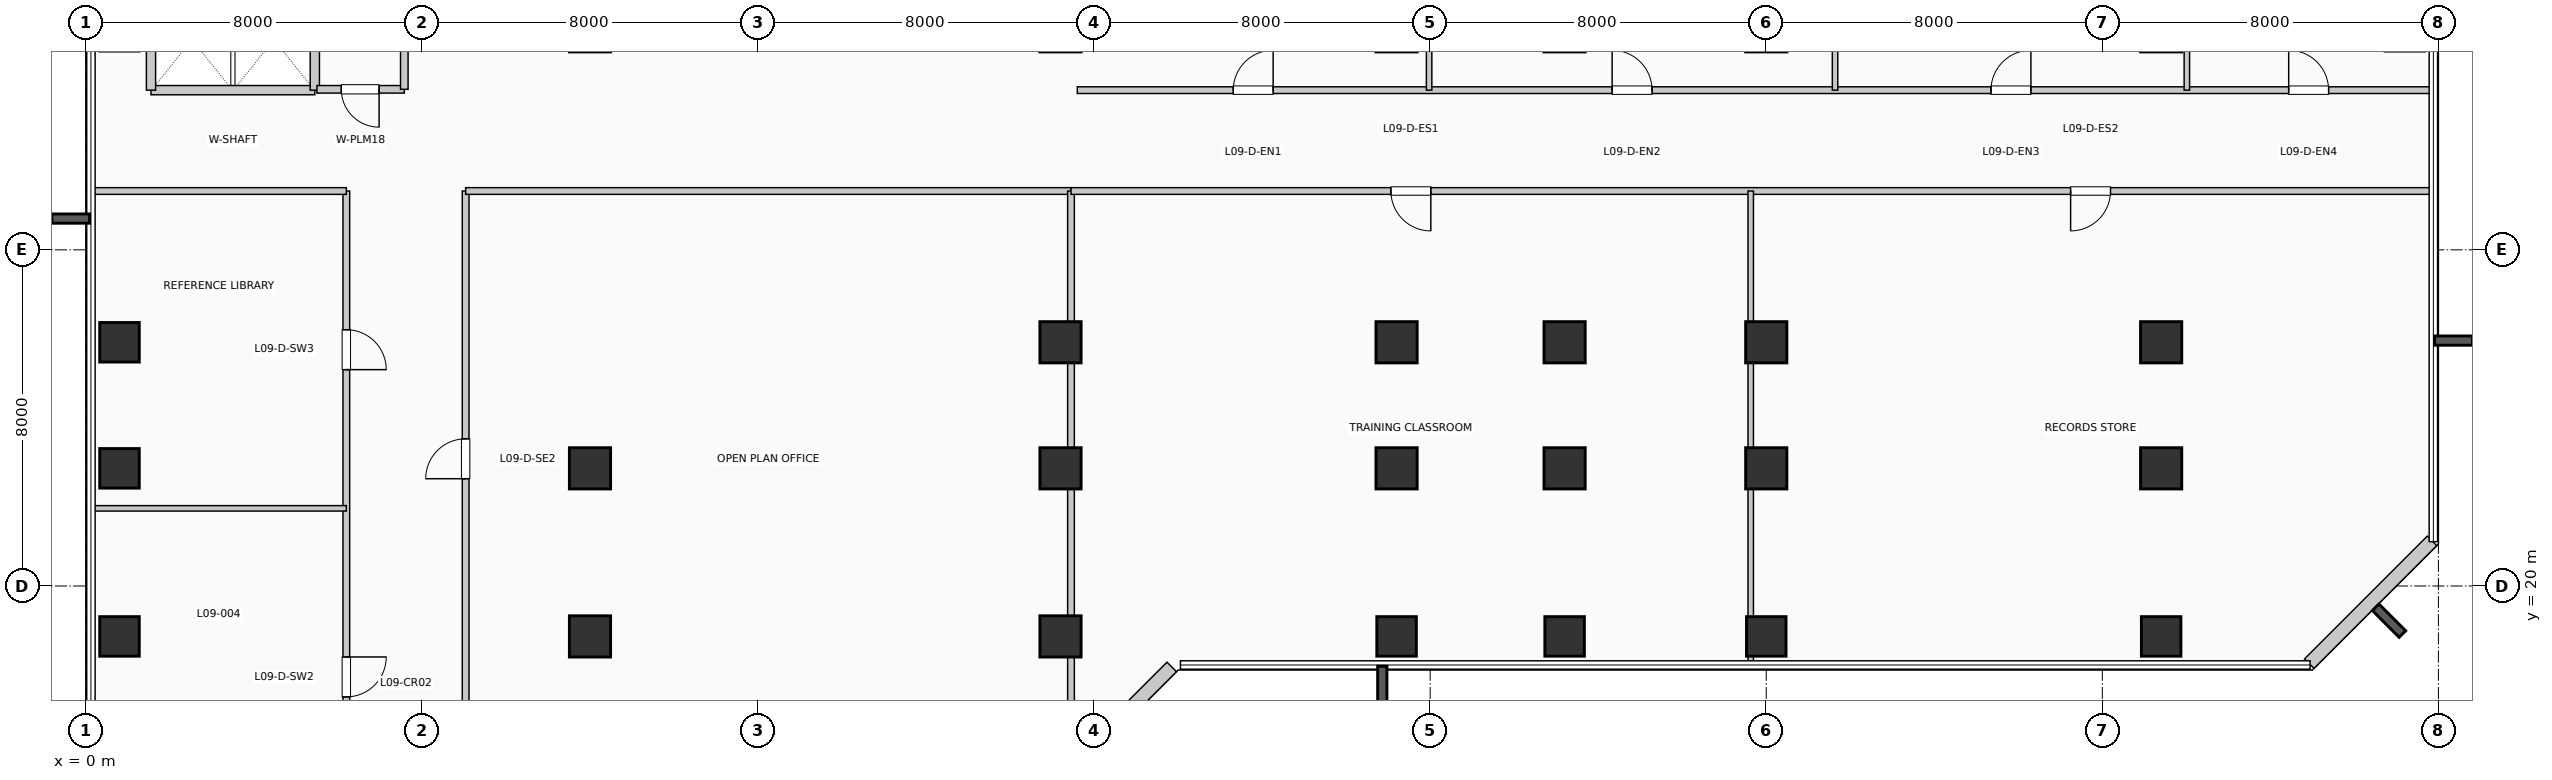
"""IFC4 building model, lengths in metres.
Left out: names, types, materials, properties, quantities, classifications, styles, units other than length and angle.
Written with IfcOpenShell. Run it as: python <this file> out.ifc"""

import sys

from ifc_helpers import new_model, si_unit, direction, frame, frame_2d, origin, origin_2d, place, context, subcontext, project, spatial, rectangle, extrude, element, fill, save


model = new_model("IFC4")
c1 = context("Model", 3, precision=1e-05, world=origin(), true_north=direction((0.0, 1.0)))
c2 = subcontext(c1, "Body", "Model", "MODEL_VIEW")
j1 = project(units=[si_unit("LENGTHUNIT", "METRE"), si_unit("PLANEANGLEUNIT", "RADIAN")], contexts=[c1])
p1 = place(None, origin())
s1 = spatial("IfcSite", under=j1, at=p1, CompositionType="ELEMENT")
p2 = place(p1, origin())
s2 = spatial("IfcBuilding", under=s1, at=p2, CompositionType="ELEMENT")
p3 = place(p2, frame((0.0, 0.0, 42.24)))
s3 = spatial("IfcBuildingStorey", under=s2, at=p3, CompositionType="ELEMENT", Elevation=42.24)
for number, where, z_axis, x_axis in (
    (1, (0.8, 18.8, 0.0), (0.0, 0.0, 1.0), (1.0, 0.0, 0.0)),
    (2, (0.8, 22.8, 0.0), (0.0, 0.0, 1.0), (1.0, 0.0, 0.0)),
    (3, (0.8, 25.8, 0.0), (0.0, 0.0, 1.0), (1.0, 0.0, 0.0)),
):
    element("IfcColumn", number, at=place(p3, frame(where, z_axis=z_axis, x_axis=x_axis)), inside=s3, PredefinedType="COLUMN", context=c2, shape_type="SweptSolid", body=[
        extrude(rectangle(XDim=0.94, YDim=0.94, at=origin_2d()), origin(), (0.0, 0.0, 1.0), 3.96),
    ])
for number, where, z_axis, x_axis in (
    (4, (12.0, 18.8, 0.0), (0.0, 0.0, 1.0), (1.0, 0.0, 0.0)),
    (5, (12.0, 22.8, 0.0), (0.0, 0.0, 1.0), (1.0, 0.0, 0.0)),
    (6, (23.2, 18.8, 0.0), (0.0, 0.0, 1.0), (1.0, 0.0, 0.0)),
    (7, (23.2, 22.8, 0.0), (0.0, 0.0, 1.0), (1.0, 0.0, 0.0)),
    (8, (23.2, 25.8, 0.0), (0.0, 0.0, 1.0), (1.0, 0.0, 0.0)),
):
    element("IfcColumn", number, at=place(p3, frame(where, z_axis=z_axis, x_axis=x_axis)), inside=s3, PredefinedType="COLUMN", context=c2, shape_type="SweptSolid", body=[
        extrude(rectangle(XDim=0.98, YDim=0.98, at=origin_2d()), origin(), (0.0, 0.0, 1.0), 3.96),
    ])
p4 = place(p3, frame((31.2, 18.8, 0.0), z_axis=(0.0, 0.0, 1.0), x_axis=(1.0, 0.0, 0.0)))
e9 = element("IfcColumn", 9, at=p4, inside=s3, PredefinedType="COLUMN", context=c2, shape_type="SweptSolid", body=[
    extrude(rectangle(XDim=0.94, YDim=0.94, at=origin_2d()), origin(), (0.0, 0.0, 1.0), 3.96),
])
for number, where, z_axis, x_axis in (
    (10, (31.2, 22.8, 0.0), (0.0, 0.0, 1.0), (1.0, 0.0, 0.0)),
    (11, (31.2, 25.8, 0.0), (0.0, 0.0, 1.0), (1.0, 0.0, 0.0)),
):
    element("IfcColumn", number, at=place(p3, frame(where, z_axis=z_axis, x_axis=x_axis)), inside=s3, PredefinedType="COLUMN", context=c2, shape_type="SweptSolid", body=[
        extrude(rectangle(XDim=0.98, YDim=0.98, at=origin_2d()), origin(), (0.0, 0.0, 1.0), 3.96),
    ])
p5 = place(p3, frame((35.2, 18.8, 0.0), z_axis=(0.0, 0.0, 1.0), x_axis=(1.0, 0.0, 0.0)))
e12 = element("IfcColumn", 12, at=p5, inside=s3, PredefinedType="COLUMN", context=c2, shape_type="SweptSolid", body=[
    extrude(rectangle(XDim=0.94, YDim=0.94, at=origin_2d()), origin(), (0.0, 0.0, 1.0), 3.96),
])
for number, where, z_axis, x_axis in (
    (13, (35.2, 22.8, 0.0), (0.0, 0.0, 1.0), (1.0, 0.0, 0.0)),
    (14, (35.2, 25.8, 0.0), (0.0, 0.0, 1.0), (1.0, 0.0, 0.0)),
):
    element("IfcColumn", number, at=place(p3, frame(where, z_axis=z_axis, x_axis=x_axis)), inside=s3, PredefinedType="COLUMN", context=c2, shape_type="SweptSolid", body=[
        extrude(rectangle(XDim=0.98, YDim=0.98, at=origin_2d()), origin(), (0.0, 0.0, 1.0), 3.96),
    ])
p6 = place(p3, frame((40.0, 18.8, 0.0), z_axis=(0.0, 0.0, 1.0), x_axis=(1.0, 0.0, 0.0)))
e15 = element("IfcColumn", 15, at=p6, inside=s3, PredefinedType="COLUMN", context=c2, shape_type="SweptSolid", body=[
    extrude(rectangle(XDim=0.94, YDim=0.94, at=origin_2d()), origin(), (0.0, 0.0, 1.0), 3.96),
])
for number, where, z_axis, x_axis in (
    (16, (40.0, 22.8, 0.0), (0.0, 0.0, 1.0), (1.0, 0.0, 0.0)),
    (17, (40.0, 25.8, 0.0), (0.0, 0.0, 1.0), (1.0, 0.0, 0.0)),
):
    element("IfcColumn", number, at=place(p3, frame(where, z_axis=z_axis, x_axis=x_axis)), inside=s3, PredefinedType="COLUMN", context=c2, shape_type="SweptSolid", body=[
        extrude(rectangle(XDim=0.98, YDim=0.98, at=origin_2d()), origin(), (0.0, 0.0, 1.0), 3.96),
    ])
p7 = place(p3, frame((49.4, 18.8, 0.0), z_axis=(0.0, 0.0, 1.0), x_axis=(1.0, 0.0, 0.0)))
e18 = element("IfcColumn", 18, at=p7, inside=s3, PredefinedType="COLUMN", context=c2, shape_type="SweptSolid", body=[
    extrude(rectangle(XDim=0.94, YDim=0.94, at=origin_2d()), origin(), (0.0, 0.0, 1.0), 3.96),
])
for number, where, z_axis, x_axis in (
    (19, (49.4, 22.8, 0.0), (0.0, 0.0, 1.0), (1.0, 0.0, 0.0)),
    (20, (49.4, 25.8, 0.0), (0.0, 0.0, 1.0), (1.0, 0.0, 0.0)),
):
    element("IfcColumn", number, at=place(p3, frame(where, z_axis=z_axis, x_axis=x_axis)), inside=s3, PredefinedType="COLUMN", context=c2, shape_type="SweptSolid", body=[
        extrude(rectangle(XDim=0.98, YDim=0.98, at=origin_2d()), origin(), (0.0, 0.0, 1.0), 3.96),
    ])
p8 = place(p3, frame((23.926, 16.152, 0.0), z_axis=(0.0, 0.0, 1.0), x_axis=(0.707106781187, 0.707106781187, 0.0)))
e21 = element("IfcWall", 21, at=p8, inside=s3, PredefinedType="SOLIDWALL", context=c2, shape_type="SweptSolid", body=[
    extrude(rectangle(XDim=2.718, YDim=0.32, at=frame_2d((1.359, 0.0))), origin(), (0.0, 0.0, 1.0), 3.71),
])
p9 = place(p3, frame((52.926, 18.152, 0.0), z_axis=(0.0, 0.0, 1.0), x_axis=(0.707106781187, 0.707106781187, 0.0)))
e22 = element("IfcWall", 22, at=p9, inside=s3, PredefinedType="SOLIDWALL", context=c2, shape_type="SweptSolid", body=[
    extrude(rectangle(XDim=4.133, YDim=0.32, at=frame_2d((2.066, 0.0))), origin(), (0.0, 0.0, 1.0), 3.71),
])
p10 = place(p3, frame((1.55, 31.8, 0.0), z_axis=(0.0, 0.0, 1.0), x_axis=(1.0, 0.0, 0.0)))
e23 = element("IfcWall", 23, at=p10, inside=s3, PredefinedType="PARTITIONING", context=c2, shape_type="SweptSolid", body=[
    extrude(rectangle(XDim=3.9, YDim=0.22, at=frame_2d((1.95, 0.0))), origin(), (0.0, 0.0, 1.0), 3.71),
])
for number, where, z_axis, x_axis in (
    (24, (1.55, 31.8, 0.0), (0.0, 0.0, 1.0), (0.0, 1.0, 0.0)),
    (25, (5.45, 31.8, 0.0), (0.0, 0.0, 1.0), (0.0, 1.0, 0.0)),
):
    element("IfcWall", number, at=place(p3, frame(where, z_axis=z_axis, x_axis=x_axis)), inside=s3, PredefinedType="PARTITIONING", context=c2, shape_type="SweptSolid", body=[
        extrude(rectangle(XDim=2.38, YDim=0.22, at=frame_2d((1.19, 0.0))), origin(), (0.0, 0.0, 1.0), 3.71),
    ])
p11 = place(p3, frame((5.5, 31.82, 0.0), z_axis=(0.0, 0.0, 1.0), x_axis=(1.0, 0.0, 0.0)))
e26 = element("IfcWall", 26, at=p11, inside=s3, PredefinedType="PLUMBINGWALL", context=c2, shape_type="SweptSolid", body=[
    extrude(rectangle(XDim=2.08, YDim=0.18, at=frame_2d((1.04, 0.0))), origin(), (0.0, 0.0, 1.0), 3.71),
])
p12 = place(p11, frame((1.48, 0.0, 0.0), z_axis=(0.0, 0.0, 1.0), x_axis=(-1.0, 0.0, 0.0)))
e27 = element("IfcOpeningElement", 27, at=p12, cuts=e26, PredefinedType="OPENING", context=c2, shape_type="SweptSolid", body=[
    extrude(rectangle(XDim=0.9, YDim=2.1, at=frame_2d((0.45, 1.05))), frame((0.0, 0.1, 0.0), z_axis=(0.0, -1.0, 0.0), x_axis=(1.0, 0.0, 0.0)), (0.0, 0.0, 1.0), 0.2),
])
p13 = place(p3, frame((7.58, 31.82, 0.0), z_axis=(0.0, 0.0, 1.0), x_axis=(0.0, 1.0, 0.0)))
e28 = element("IfcWall", 28, at=p13, inside=s3, PredefinedType="PLUMBINGWALL", context=c2, shape_type="SweptSolid", body=[
    extrude(rectangle(XDim=2.36, YDim=0.18, at=frame_2d((1.18, 0.0))), origin(), (0.0, 0.0, 1.0), 3.71),
])
p14 = place(p3, frame((6.2, 5.8, 0.0), z_axis=(0.0, 0.0, 1.0), x_axis=(0.0, 1.0, 0.0)))
e29 = element("IfcWall", 29, at=p14, inside=s3, PredefinedType="PARTITIONING", context=c2, shape_type="SweptSolid", body=[
    extrude(rectangle(XDim=23.6, YDim=0.16, at=frame_2d((11.8, 0.0))), origin(), (0.0, 0.0, 1.0), 3.71),
])
p15 = place(p14, frame((4.487, 0.0, 0.0), z_axis=(0.0, 0.0, 1.0), x_axis=(-1.0, 0.0, 0.0)))
e30 = element("IfcOpeningElement", 30, at=p15, cuts=e29, PredefinedType="OPENING", context=c2, shape_type="SweptSolid", body=[
    extrude(rectangle(XDim=0.95, YDim=2.15, at=frame_2d((0.475, 1.075))), frame((0.0, 0.09, 0.0), z_axis=(0.0, -1.0, 0.0), x_axis=(1.0, 0.0, 0.0)), (0.0, 0.0, 1.0), 0.18),
])
p16 = place(p14, frame((12.511, 0.0, 0.0), z_axis=(0.0, 0.0, 1.0), x_axis=(-1.0, 0.0, 0.0)))
e31 = element("IfcOpeningElement", 31, at=p16, cuts=e29, PredefinedType="OPENING", context=c2, shape_type="SweptSolid", body=[
    extrude(rectangle(XDim=0.95, YDim=2.15, at=frame_2d((0.475, 1.075))), frame((0.0, 0.09, 0.0), z_axis=(0.0, -1.0, 0.0), x_axis=(1.0, 0.0, 0.0)), (0.0, 0.0, 1.0), 0.18),
])
p17 = place(p14, frame((20.299, 0.0, 0.0), z_axis=(0.0, 0.0, 1.0), x_axis=(-1.0, 0.0, 0.0)))
e32 = element("IfcOpeningElement", 32, at=p17, cuts=e29, PredefinedType="OPENING", context=c2, shape_type="SweptSolid", body=[
    extrude(rectangle(XDim=0.95, YDim=2.15, at=frame_2d((0.475, 1.075))), frame((0.0, 0.09, 0.0), z_axis=(0.0, -1.0, 0.0), x_axis=(1.0, 0.0, 0.0)), (0.0, 0.0, 1.0), 0.18),
])
p18 = place(p3, frame((9.04, 5.8, 0.0), z_axis=(0.0, 0.0, 1.0), x_axis=(0.0, 1.0, 0.0)))
e33 = element("IfcWall", 33, at=p18, inside=s3, PredefinedType="PARTITIONING", context=c2, shape_type="SweptSolid", body=[
    extrude(rectangle(XDim=23.6, YDim=0.16, at=frame_2d((11.8, 0.0))), origin(), (0.0, 0.0, 1.0), 3.71),
])
p19 = place(p18, frame((4.953, 0.0, 0.0)))
e34 = element("IfcOpeningElement", 34, at=p19, cuts=e33, PredefinedType="OPENING", context=c2, shape_type="SweptSolid", body=[
    extrude(rectangle(XDim=0.95, YDim=2.15, at=frame_2d((0.475, 1.075))), frame((0.0, 0.09, 0.0), z_axis=(0.0, -1.0, 0.0), x_axis=(1.0, 0.0, 0.0)), (0.0, 0.0, 1.0), 0.18),
])
p20 = place(p18, frame((16.753, 0.0, 0.0)))
e35 = element("IfcOpeningElement", 35, at=p20, cuts=e33, PredefinedType="OPENING", context=c2, shape_type="SweptSolid", body=[
    extrude(rectangle(XDim=0.95, YDim=2.15, at=frame_2d((0.475, 1.075))), frame((0.0, 0.09, 0.0), z_axis=(0.0, -1.0, 0.0), x_axis=(1.0, 0.0, 0.0)), (0.0, 0.0, 1.0), 0.18),
])
p21 = place(p3, frame((0.19, 29.4, 0.0), z_axis=(0.0, 0.0, 1.0), x_axis=(1.0, 0.0, 0.0)))
e36 = element("IfcWall", 36, at=p21, inside=s3, PredefinedType="PARTITIONING", context=c2, shape_type="SweptSolid", body=[
    extrude(rectangle(XDim=6.01, YDim=0.16, at=frame_2d((3.005, 0.0))), origin(), (0.0, 0.0, 1.0), 3.365),
])
p22 = place(p3, frame((9.04, 29.4, 0.0), z_axis=(0.0, 0.0, 1.0), x_axis=(1.0, 0.0, 0.0)))
e37 = element("IfcWall", 37, at=p22, inside=s3, PredefinedType="PARTITIONING", context=c2, shape_type="SweptSolid", body=[
    extrude(rectangle(XDim=14.41, YDim=0.16, at=frame_2d((7.205, 0.0))), origin(), (0.0, 0.0, 1.0), 3.365),
])
p23 = place(p3, frame((23.45, 0.19, 0.0), z_axis=(0.0, 0.0, 1.0), x_axis=(0.0, 1.0, 0.0)))
e38 = element("IfcWall", 38, at=p23, inside=s3, PredefinedType="PARTITIONING", context=c2, shape_type="SweptSolid", body=[
    extrude(rectangle(XDim=29.21, YDim=0.16, at=frame_2d((14.605, 0.0))), origin(), (0.0, 0.0, 1.0), 2.995),
])
p24 = place(p3, frame((0.19, 21.848, 0.0), z_axis=(0.0, 0.0, 1.0), x_axis=(1.0, 0.0, 0.0)))
e39 = element("IfcWall", 39, at=p24, inside=s3, PredefinedType="PARTITIONING", context=c2, shape_type="SweptSolid", body=[
    extrude(rectangle(XDim=6.01, YDim=0.13, at=frame_2d((3.005, 0.0))), origin(), (0.0, 0.0, 1.0), 3.71),
])
p25 = place(p3, frame((23.45, 29.4, 0.0), z_axis=(0.0, 0.0, 1.0), x_axis=(1.0, 0.0, 0.0)))
e40 = element("IfcWall", 40, at=p25, inside=s3, PredefinedType="PARTITIONING", context=c2, shape_type="SweptSolid", body=[
    extrude(rectangle(XDim=32.36, YDim=0.16, at=frame_2d((16.18, 0.0))), origin(), (0.0, 0.0, 1.0), 3.365),
])
p26 = place(p25, frame((8.565, 0.0, 0.0), z_axis=(0.0, 0.0, 1.0), x_axis=(-1.0, 0.0, 0.0)))
e41 = element("IfcOpeningElement", 41, at=p26, cuts=e40, PredefinedType="OPENING", context=c2, shape_type="SweptSolid", body=[
    extrude(rectangle(XDim=0.95, YDim=2.15, at=frame_2d((0.475, 1.075))), frame((0.0, 0.09, 0.0), z_axis=(0.0, -1.0, 0.0), x_axis=(1.0, 0.0, 0.0)), (0.0, 0.0, 1.0), 0.18),
])
p27 = place(p25, frame((24.745, 0.0, 0.0), z_axis=(0.0, 0.0, 1.0), x_axis=(-1.0, 0.0, 0.0)))
e42 = element("IfcOpeningElement", 42, at=p27, cuts=e40, PredefinedType="OPENING", context=c2, shape_type="SweptSolid", body=[
    extrude(rectangle(XDim=0.95, YDim=2.15, at=frame_2d((0.475, 1.075))), frame((0.0, 0.09, 0.0), z_axis=(0.0, -1.0, 0.0), x_axis=(1.0, 0.0, 0.0)), (0.0, 0.0, 1.0), 0.18),
])
p28 = place(p3, frame((23.6, 31.8, 0.0), z_axis=(0.0, 0.0, 1.0), x_axis=(1.0, 0.0, 0.0)))
e43 = element("IfcWall", 43, at=p28, inside=s3, PredefinedType="PARTITIONING", context=c2, shape_type="SweptSolid", body=[
    extrude(rectangle(XDim=32.21, YDim=0.16, at=frame_2d((16.105, 0.0))), origin(), (0.0, 0.0, 1.0), 3.71),
])
p29 = place(p28, frame((3.712, 0.0, 0.0)))
e44 = element("IfcOpeningElement", 44, at=p29, cuts=e43, PredefinedType="OPENING", context=c2, shape_type="SweptSolid", body=[
    extrude(rectangle(XDim=0.95, YDim=2.15, at=frame_2d((0.475, 1.075))), frame((0.0, 0.09, 0.0), z_axis=(0.0, -1.0, 0.0), x_axis=(1.0, 0.0, 0.0)), (0.0, 0.0, 1.0), 0.18),
])
p30 = place(p28, frame((12.731, 0.0, 0.0)))
e45 = element("IfcOpeningElement", 45, at=p30, cuts=e43, PredefinedType="OPENING", context=c2, shape_type="SweptSolid", body=[
    extrude(rectangle(XDim=0.95, YDim=2.15, at=frame_2d((0.475, 1.075))), frame((0.0, 0.09, 0.0), z_axis=(0.0, -1.0, 0.0), x_axis=(1.0, 0.0, 0.0)), (0.0, 0.0, 1.0), 0.18),
])
p31 = place(p28, frame((21.75, 0.0, 0.0)))
e46 = element("IfcOpeningElement", 46, at=p31, cuts=e43, PredefinedType="OPENING", context=c2, shape_type="SweptSolid", body=[
    extrude(rectangle(XDim=0.95, YDim=2.15, at=frame_2d((0.475, 1.075))), frame((0.0, 0.09, 0.0), z_axis=(0.0, -1.0, 0.0), x_axis=(1.0, 0.0, 0.0)), (0.0, 0.0, 1.0), 0.18),
])
p32 = place(p28, frame((28.836, 0.0, 0.0)))
e47 = element("IfcOpeningElement", 47, at=p32, cuts=e43, PredefinedType="OPENING", context=c2, shape_type="SweptSolid", body=[
    extrude(rectangle(XDim=0.95, YDim=2.15, at=frame_2d((0.475, 1.075))), frame((0.0, 0.09, 0.0), z_axis=(0.0, -1.0, 0.0), x_axis=(1.0, 0.0, 0.0)), (0.0, 0.0, 1.0), 0.18),
])
p33 = place(p3, frame((39.63, 18.19, 0.0), z_axis=(0.0, 0.0, 1.0), x_axis=(0.0, 1.0, 0.0)))
e48 = element("IfcWall", 48, at=p33, inside=s3, PredefinedType="PARTITIONING", context=c2, shape_type="SweptSolid", body=[
    extrude(rectangle(XDim=11.21, YDim=0.13, at=frame_2d((5.605, 0.0))), origin(), (0.0, 0.0, 1.0), 2.995),
])
for number, where, z_axis, x_axis in (
    (49, (31.975, 31.8, 0.0), (0.0, 0.0, 1.0), (0.0, 1.0, 0.0)),
    (50, (41.638, 31.8, 0.0), (0.0, 0.0, 1.0), (0.0, 1.0, 0.0)),
    (51, (50.012, 31.8, 0.0), (0.0, 0.0, 1.0), (0.0, 1.0, 0.0)),
):
    element("IfcWall", number, at=place(p3, frame(where, z_axis=z_axis, x_axis=x_axis)), inside=s3, PredefinedType="PARTITIONING", context=c2, shape_type="SweptSolid", body=[
        extrude(rectangle(XDim=14.01, YDim=0.13, at=frame_2d((7.005, 0.0))), origin(), (0.0, 0.0, 1.0), 3.71),
    ])
p34 = place(p12, origin())
e52 = element("IfcDoor", 52, at=p34, inside=s3, OperationType="SINGLE_SWING_RIGHT", PredefinedType="DOOR", context=c2, shape_type="SweptSolid", body=[
    extrude(rectangle(XDim=0.9, YDim=2.1, at=frame_2d((0.45, 1.05))), frame((0.0, 0.025, 0.0), z_axis=(0.0, -1.0, 0.0), x_axis=(1.0, 0.0, 0.0)), (0.0, 0.0, 1.0), 0.05),
])
fill(e27, e52)
p35 = place(p16, origin())
e53 = element("IfcDoor", 53, at=p35, inside=s3, OperationType="SINGLE_SWING_RIGHT", PredefinedType="DOOR", context=c2, shape_type="SweptSolid", body=[
    extrude(rectangle(XDim=0.95, YDim=2.15, at=frame_2d((0.475, 1.075))), frame((0.0, 0.025, 0.0), z_axis=(0.0, -1.0, 0.0), x_axis=(1.0, 0.0, 0.0)), (0.0, 0.0, 1.0), 0.05),
])
fill(e31, e53)
p36 = place(p17, origin())
e54 = element("IfcDoor", 54, at=p36, inside=s3, OperationType="SINGLE_SWING_LEFT", PredefinedType="DOOR", context=c2, shape_type="SweptSolid", body=[
    extrude(rectangle(XDim=0.95, YDim=2.15, at=frame_2d((0.475, 1.075))), frame((0.0, 0.025, 0.0), z_axis=(0.0, -1.0, 0.0), x_axis=(1.0, 0.0, 0.0)), (0.0, 0.0, 1.0), 0.05),
])
fill(e32, e54)
p37 = place(p20, origin())
e55 = element("IfcDoor", 55, at=p37, inside=s3, OperationType="SINGLE_SWING_LEFT", PredefinedType="DOOR", context=c2, shape_type="SweptSolid", body=[
    extrude(rectangle(XDim=0.95, YDim=2.15, at=frame_2d((0.475, 1.075))), frame((0.0, 0.025, 0.0), z_axis=(0.0, -1.0, 0.0), x_axis=(1.0, 0.0, 0.0)), (0.0, 0.0, 1.0), 0.05),
])
fill(e35, e55)
p38 = place(p26, origin())
e56 = element("IfcDoor", 56, at=p38, inside=s3, OperationType="SINGLE_SWING_RIGHT", PredefinedType="DOOR", context=c2, shape_type="SweptSolid", body=[
    extrude(rectangle(XDim=0.95, YDim=2.15, at=frame_2d((0.475, 1.075))), frame((0.0, 0.025, 0.0), z_axis=(0.0, -1.0, 0.0), x_axis=(1.0, 0.0, 0.0)), (0.0, 0.0, 1.0), 0.05),
])
fill(e41, e56)
p39 = place(p27, origin())
e57 = element("IfcDoor", 57, at=p39, inside=s3, OperationType="SINGLE_SWING_LEFT", PredefinedType="DOOR", context=c2, shape_type="SweptSolid", body=[
    extrude(rectangle(XDim=0.95, YDim=2.15, at=frame_2d((0.475, 1.075))), frame((0.0, 0.025, 0.0), z_axis=(0.0, -1.0, 0.0), x_axis=(1.0, 0.0, 0.0)), (0.0, 0.0, 1.0), 0.05),
])
fill(e42, e57)
p40 = place(p29, origin())
e58 = element("IfcDoor", 58, at=p40, inside=s3, OperationType="SINGLE_SWING_RIGHT", PredefinedType="DOOR", context=c2, shape_type="SweptSolid", body=[
    extrude(rectangle(XDim=0.95, YDim=2.15, at=frame_2d((0.475, 1.075))), frame((0.0, 0.025, 0.0), z_axis=(0.0, -1.0, 0.0), x_axis=(1.0, 0.0, 0.0)), (0.0, 0.0, 1.0), 0.05),
])
fill(e44, e58)
p41 = place(p30, origin())
e59 = element("IfcDoor", 59, at=p41, inside=s3, OperationType="SINGLE_SWING_LEFT", PredefinedType="DOOR", context=c2, shape_type="SweptSolid", body=[
    extrude(rectangle(XDim=0.95, YDim=2.15, at=frame_2d((0.475, 1.075))), frame((0.0, 0.025, 0.0), z_axis=(0.0, -1.0, 0.0), x_axis=(1.0, 0.0, 0.0)), (0.0, 0.0, 1.0), 0.05),
])
fill(e45, e59)
p42 = place(p31, origin())
e60 = element("IfcDoor", 60, at=p42, inside=s3, OperationType="SINGLE_SWING_RIGHT", PredefinedType="DOOR", context=c2, shape_type="SweptSolid", body=[
    extrude(rectangle(XDim=0.95, YDim=2.15, at=frame_2d((0.475, 1.075))), frame((0.0, 0.025, 0.0), z_axis=(0.0, -1.0, 0.0), x_axis=(1.0, 0.0, 0.0)), (0.0, 0.0, 1.0), 0.05),
])
fill(e46, e60)
p43 = place(p32, origin())
e61 = element("IfcDoor", 61, at=p43, inside=s3, OperationType="SINGLE_SWING_LEFT", PredefinedType="DOOR", context=c2, shape_type="SweptSolid", body=[
    extrude(rectangle(XDim=0.95, YDim=2.15, at=frame_2d((0.475, 1.075))), frame((0.0, 0.025, 0.0), z_axis=(0.0, -1.0, 0.0), x_axis=(1.0, 0.0, 0.0)), (0.0, 0.0, 1.0), 0.05),
])
fill(e47, e61)
save(model, sys.argv[1])
